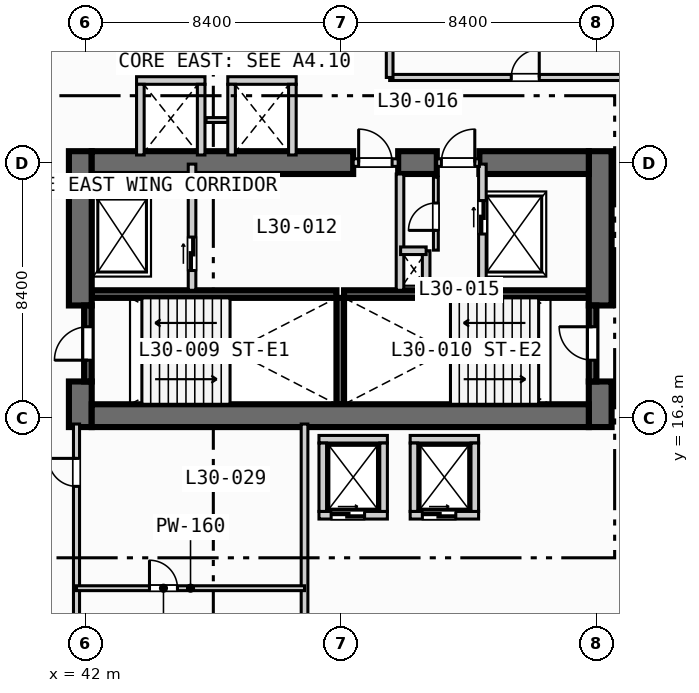
"""IFC4 building model, lengths in metres.
Left out: names, types, materials, properties, quantities, classifications, styles, units other than length and angle.
Written with IfcOpenShell. Run it as: python <this file> out.ifc"""

import sys

from ifc_helpers import new_model, si_unit, direction, frame, frame_2d, origin, place, context, subcontext, project, spatial, rectangle, extrude, element, fill, save


model = new_model("IFC4")
c1 = context("Model", 3, precision=1e-05, world=origin(), true_north=direction((0.0, 1.0)))
c2 = subcontext(c1, "Body", "Model", "MODEL_VIEW")
j1 = project(units=[si_unit("LENGTHUNIT", "METRE"), si_unit("PLANEANGLEUNIT", "RADIAN")], contexts=[c1])
p1 = place(None, origin())
s1 = spatial("IfcSite", under=j1, at=p1, CompositionType="ELEMENT")
p2 = place(p1, origin())
s2 = spatial("IfcBuilding", under=s1, at=p2, CompositionType="ELEMENT")
p3 = place(p2, frame((0.0, 0.0, 126.6)))
s3 = spatial("IfcBuildingStorey", under=s2, at=p3, CompositionType="ELEMENT", Elevation=126.6)
for number, where, z_axis, x_axis in (
    (1, (42.2, 20.875, 0.0), (0.0, 0.0, 1.0), (1.0, 0.0, 0.0)),
    (2, (50.5, 20.875, 0.0), (0.0, 0.0, 1.0), (1.0, 0.0, 0.0)),
):
    element("IfcWall", number, at=place(p3, frame(where, z_axis=z_axis, x_axis=x_axis)), inside=s3, PredefinedType="SOLIDWALL", context=c2, shape_type="SweptSolid", body=[
        extrude(rectangle(XDim=8.05, YDim=0.25, at=frame_2d((4.025, 0.0))), origin(), (0.0, 0.0, 1.0), 3.55),
    ])
p4 = place(p3, frame((50.375, 17.25, 0.0), z_axis=(0.0, 0.0, 1.0), x_axis=(0.0, 1.0, 0.0)))
e3 = element("IfcWall", 3, at=p4, inside=s3, PredefinedType="SOLIDWALL", context=c2, shape_type="SweptSolid", body=[
    extrude(rectangle(XDim=3.5, YDim=0.25, at=frame_2d((1.75, 0.0))), origin(), (0.0, 0.0, 1.0), 3.55),
])
p5 = place(p3, frame((41.825, 16.5, 0.0), z_axis=(0.0, 0.0, 1.0), x_axis=(0.0, 1.0, 0.0)))
e4 = element("IfcWall", 4, at=p5, inside=s3, PredefinedType="SHEAR", context=c2, shape_type="SweptSolid", body=[
    extrude(rectangle(XDim=1.5, YDim=0.75, at=frame_2d((0.75, 0.0))), origin(), (0.0, 0.0, 1.0), 3.55),
])
p6 = place(p3, frame((41.825, 20.5, 0.0), z_axis=(0.0, 0.0, 1.0), x_axis=(0.0, 1.0, 0.0)))
e5 = element("IfcWall", 5, at=p6, inside=s3, PredefinedType="SHEAR", context=c2, shape_type="SweptSolid", body=[
    extrude(rectangle(XDim=5.075, YDim=0.75, at=frame_2d((2.538, 0.0))), origin(), (0.0, 0.0, 1.0), 3.55),
])
p7 = place(p3, frame((58.925, 16.5, 0.0), z_axis=(0.0, 0.0, 1.0), x_axis=(0.0, 1.0, 0.0)))
e6 = element("IfcWall", 6, at=p7, inside=s3, PredefinedType="SHEAR", context=c2, shape_type="SweptSolid", body=[
    extrude(rectangle(XDim=1.5, YDim=0.75, at=frame_2d((0.75, 0.0))), origin(), (0.0, 0.0, 1.0), 3.55),
])
p8 = place(p3, frame((58.925, 20.5, 0.0), z_axis=(0.0, 0.0, 1.0), x_axis=(0.0, 1.0, 0.0)))
e7 = element("IfcWall", 7, at=p8, inside=s3, PredefinedType="SHEAR", context=c2, shape_type="SweptSolid", body=[
    extrude(rectangle(XDim=5.075, YDim=0.75, at=frame_2d((2.538, 0.0))), origin(), (0.0, 0.0, 1.0), 3.55),
])
p9 = place(p3, frame((42.2, 16.875, 0.0), z_axis=(0.0, 0.0, 1.0), x_axis=(1.0, 0.0, 0.0)))
e8 = element("IfcWall", 8, at=p9, inside=s3, PredefinedType="SHEAR", context=c2, shape_type="SweptSolid", body=[
    extrude(rectangle(XDim=16.35, YDim=0.75, at=frame_2d((8.175, 0.0))), origin(), (0.0, 0.0, 1.0), 3.55),
])
p10 = place(p3, frame((42.2, 25.2, 0.0), z_axis=(0.0, 0.0, 1.0), x_axis=(1.0, 0.0, 0.0)))
e9 = element("IfcWall", 9, at=p10, inside=s3, PredefinedType="SHEAR", context=c2, shape_type="SweptSolid", body=[
    extrude(rectangle(XDim=8.6, YDim=0.75, at=frame_2d((4.3, 0.0))), origin(), (0.0, 0.0, 1.0), 3.55),
])
p11 = place(p3, frame((52.28, 25.2, 0.0), z_axis=(0.0, 0.0, 1.0), x_axis=(1.0, 0.0, 0.0)))
e10 = element("IfcWall", 10, at=p11, inside=s3, PredefinedType="SHEAR", context=c2, shape_type="SweptSolid", body=[
    extrude(rectangle(XDim=1.27, YDim=0.75, at=frame_2d((0.635, 0.0))), origin(), (0.0, 0.0, 1.0), 3.55),
])
p12 = place(p3, frame((54.95, 25.2, 0.0), z_axis=(0.0, 0.0, 1.0), x_axis=(1.0, 0.0, 0.0)))
e11 = element("IfcWall", 11, at=p12, inside=s3, PredefinedType="SHEAR", context=c2, shape_type="SweptSolid", body=[
    extrude(rectangle(XDim=3.6, YDim=0.75, at=frame_2d((1.8, 0.0))), origin(), (0.0, 0.0, 1.0), 3.55),
])
p13 = place(p3, frame((42.075, 18.0, 0.0), z_axis=(0.0, 0.0, 1.0), x_axis=(0.0, 1.0, 0.0)))
e12 = element("IfcWall", 12, at=p13, inside=s3, PredefinedType="SOLIDWALL", context=c2, shape_type="SweptSolid", body=[
    extrude(rectangle(XDim=2.5, YDim=0.25, at=frame_2d((1.25, 0.0))), origin(), (0.0, 0.0, 1.0), 3.55),
])
p14 = place(p13, frame((0.7, 0.0, 0.0)))
e13 = element("IfcOpeningElement", 13, at=p14, cuts=e12, PredefinedType="OPENING", context=c2, shape_type="SweptSolid", body=[
    extrude(rectangle(XDim=1.1, YDim=2.15, at=frame_2d((0.55, 1.075))), frame((0.0, 0.135, 0.0), z_axis=(0.0, -1.0, 0.0), x_axis=(1.0, 0.0, 0.0)), (0.0, 0.0, 1.0), 0.27),
])
p15 = place(p3, frame((58.675, 18.0, 0.0), z_axis=(0.0, 0.0, 1.0), x_axis=(0.0, 1.0, 0.0)))
e14 = element("IfcWall", 14, at=p15, inside=s3, PredefinedType="SOLIDWALL", context=c2, shape_type="SweptSolid", body=[
    extrude(rectangle(XDim=2.5, YDim=0.25, at=frame_2d((1.25, 0.0))), origin(), (0.0, 0.0, 1.0), 3.55),
])
p16 = place(p15, frame((0.7, 0.0, 0.0)))
e15 = element("IfcOpeningElement", 15, at=p16, cuts=e14, PredefinedType="OPENING", context=c2, shape_type="SweptSolid", body=[
    extrude(rectangle(XDim=1.1, YDim=2.15, at=frame_2d((0.55, 1.075))), frame((0.0, 0.135, 0.0), z_axis=(0.0, -1.0, 0.0), x_axis=(1.0, 0.0, 0.0)), (0.0, 0.0, 1.0), 0.27),
])
p17 = place(p3, frame((45.5, 21.0, 0.0), z_axis=(0.0, 0.0, 1.0), x_axis=(0.0, 1.0, 0.0)))
e16 = element("IfcWall", 16, at=p17, inside=s3, PredefinedType="SOLIDWALL", context=c2, shape_type="SweptSolid", body=[
    extrude(rectangle(XDim=4.15, YDim=0.25, at=frame_2d((2.075, 0.0))), origin(), (0.0, 0.0, 1.0), 3.55),
])
p18 = place(p17, frame((0.65, 0.0, 0.0)))
e17 = element("IfcOpeningElement", 17, at=p18, cuts=e16, PredefinedType="OPENING", context=c2, shape_type="SweptSolid", body=[
    extrude(rectangle(XDim=1.1, YDim=2.15, at=frame_2d((0.55, 1.075))), frame((0.0, 0.135, 0.0), z_axis=(0.0, -1.0, 0.0), x_axis=(1.0, 0.0, 0.0)), (0.0, 0.0, 1.0), 0.27),
])
p19 = place(p3, frame((50.8, 25.2, 0.0), z_axis=(0.0, 0.0, 1.0), x_axis=(1.0, 0.0, 0.0)))
e18 = element("IfcWall", 18, at=p19, inside=s3, PredefinedType="SOLIDWALL", context=c2, shape_type="SweptSolid", body=[
    extrude(rectangle(XDim=1.48, YDim=0.25, at=frame_2d((0.74, 0.0))), origin(), (0.0, 0.0, 1.0), 3.55),
])
p20 = place(p19, frame((0.18, 0.0, 0.0)))
e19 = element("IfcOpeningElement", 19, at=p20, cuts=e18, PredefinedType="OPENING", context=c2, shape_type="SweptSolid", body=[
    extrude(rectangle(XDim=1.1, YDim=2.15, at=frame_2d((0.55, 1.075))), frame((0.0, 0.135, 0.0), z_axis=(0.0, -1.0, 0.0), x_axis=(1.0, 0.0, 0.0)), (0.0, 0.0, 1.0), 0.27),
])
p21 = place(p3, frame((52.34, 21.0, 0.0), z_axis=(0.0, 0.0, 1.0), x_axis=(0.0, 1.0, 0.0)))
e20 = element("IfcWall", 20, at=p21, inside=s3, PredefinedType="SOLIDWALL", context=c2, shape_type="SweptSolid", body=[
    extrude(rectangle(XDim=3.825, YDim=0.25, at=frame_2d((1.913, 0.0))), origin(), (0.0, 0.0, 1.0), 3.55),
])
p22 = place(p3, frame((55.05, 21.0, 0.0), z_axis=(0.0, 0.0, 1.0), x_axis=(0.0, 1.0, 0.0)))
e21 = element("IfcWall", 21, at=p22, inside=s3, PredefinedType="SOLIDWALL", context=c2, shape_type="SweptSolid", body=[
    extrude(rectangle(XDim=4.15, YDim=0.25, at=frame_2d((2.075, 0.0))), origin(), (0.0, 0.0, 1.0), 3.55),
])
p23 = place(p22, frame((1.85, 0.0, 0.0)))
e22 = element("IfcOpeningElement", 22, at=p23, cuts=e21, PredefinedType="OPENING", context=c2, shape_type="SweptSolid", body=[
    extrude(rectangle(XDim=1.1, YDim=2.15, at=frame_2d((0.55, 1.075))), frame((0.0, 0.135, 0.0), z_axis=(0.0, -1.0, 0.0), x_axis=(1.0, 0.0, 0.0)), (0.0, 0.0, 1.0), 0.27),
])
p24 = place(p3, frame((53.55, 25.2, 0.0), z_axis=(0.0, 0.0, 1.0), x_axis=(1.0, 0.0, 0.0)))
e23 = element("IfcWall", 23, at=p24, inside=s3, PredefinedType="SOLIDWALL", context=c2, shape_type="SweptSolid", body=[
    extrude(rectangle(XDim=1.4, YDim=0.25, at=frame_2d((0.7, 0.0))), origin(), (0.0, 0.0, 1.0), 3.55),
])
p25 = place(p24, frame((0.15, 0.0, 0.0)))
e24 = element("IfcOpeningElement", 24, at=p25, cuts=e23, PredefinedType="OPENING", context=c2, shape_type="SweptSolid", body=[
    extrude(rectangle(XDim=1.1, YDim=2.15, at=frame_2d((0.55, 1.075))), frame((0.0, 0.135, 0.0), z_axis=(0.0, -1.0, 0.0), x_axis=(1.0, 0.0, 0.0)), (0.0, 0.0, 1.0), 0.27),
])
p26 = place(p3, frame((53.2, 21.0, 0.0), z_axis=(0.0, 0.0, 1.0), x_axis=(0.0, 1.0, 0.0)))
e25 = element("IfcWall", 25, at=p26, inside=s3, PredefinedType="SOLIDWALL", context=c2, shape_type="SweptSolid", body=[
    extrude(rectangle(XDim=1.3, YDim=0.25, at=frame_2d((0.65, 0.0))), origin(), (0.0, 0.0, 1.0), 3.55),
])
p27 = place(p3, frame((52.36, 22.3, 0.0), z_axis=(0.0, 0.0, 1.0), x_axis=(1.0, 0.0, 0.0)))
e26 = element("IfcWall", 26, at=p27, inside=s3, PredefinedType="SOLIDWALL", context=c2, shape_type="SweptSolid", body=[
    extrude(rectangle(XDim=0.84, YDim=0.25, at=frame_2d((0.42, 0.0))), origin(), (0.0, 0.0, 1.0), 3.55),
])
p28 = place(p3, frame((53.52, 22.32, 0.0), z_axis=(0.0, 0.0, 1.0), x_axis=(0.0, 1.0, 0.0)))
e27 = element("IfcWall", 27, at=p28, inside=s3, PredefinedType="PARTITIONING", context=c2, shape_type="SweptSolid", body=[
    extrude(rectangle(XDim=2.4, YDim=0.16, at=frame_2d((1.2, 0.0))), origin(), (0.0, 0.0, 1.0), 3.55),
])
p29 = place(p28, frame((0.65, 0.0, 0.0)))
e28 = element("IfcOpeningElement", 28, at=p29, cuts=e27, PredefinedType="OPENING", context=c2, shape_type="SweptSolid", body=[
    extrude(rectangle(XDim=0.9, YDim=2.1, at=frame_2d((0.45, 1.05))), frame((0.0, 0.09, 0.0), z_axis=(0.0, -1.0, 0.0), x_axis=(1.0, 0.0, 0.0)), (0.0, 0.0, 1.0), 0.18),
])
p30 = place(p3, frame((49.675, 13.6, 0.0), z_axis=(0.0, 0.0, 1.0), x_axis=(1.0, 0.0, 0.0)))
e29 = element("IfcWall", 29, at=p30, inside=s3, PredefinedType="SOLIDWALL", context=c2, shape_type="SweptSolid", body=[
    extrude(rectangle(XDim=2.25, YDim=0.25, at=frame_2d((1.125, 0.0))), origin(), (0.0, 0.0, 1.0), 3.55),
])
p31 = place(p30, frame((0.4, 0.0, 0.0)))
e30 = element("IfcOpeningElement", 30, at=p31, cuts=e29, PredefinedType="OPENING", context=c2, shape_type="SweptSolid", body=[
    extrude(rectangle(XDim=1.1, YDim=2.15, at=frame_2d((0.55, 1.075))), frame((0.0, 0.135, 0.0), z_axis=(0.0, -1.0, 0.0), x_axis=(1.0, 0.0, 0.0)), (0.0, 0.0, 1.0), 0.27),
])
for number, where, z_axis, x_axis in (
    (31, (49.675, 16.1, 0.0), (0.0, 0.0, 1.0), (1.0, 0.0, 0.0)),
    (32, (49.8, 13.725, 0.0), (0.0, 0.0, 1.0), (0.0, 1.0, 0.0)),
    (33, (51.8, 13.725, 0.0), (0.0, 0.0, 1.0), (0.0, 1.0, 0.0)),
):
    element("IfcWall", number, at=place(p3, frame(where, z_axis=z_axis, x_axis=x_axis)), inside=s3, PredefinedType="SOLIDWALL", context=c2, shape_type="SweptSolid", body=[
        extrude(rectangle(XDim=2.25, YDim=0.25, at=frame_2d((1.125, 0.0))), origin(), (0.0, 0.0, 1.0), 3.55),
    ])
p32 = place(p3, frame((52.675, 13.6, 0.0), z_axis=(0.0, 0.0, 1.0), x_axis=(1.0, 0.0, 0.0)))
e34 = element("IfcWall", 34, at=p32, inside=s3, PredefinedType="SOLIDWALL", context=c2, shape_type="SweptSolid", body=[
    extrude(rectangle(XDim=2.25, YDim=0.25, at=frame_2d((1.125, 0.0))), origin(), (0.0, 0.0, 1.0), 3.55),
])
p33 = place(p32, frame((0.4, 0.0, 0.0)))
e35 = element("IfcOpeningElement", 35, at=p33, cuts=e34, PredefinedType="OPENING", context=c2, shape_type="SweptSolid", body=[
    extrude(rectangle(XDim=1.1, YDim=2.15, at=frame_2d((0.55, 1.075))), frame((0.0, 0.135, 0.0), z_axis=(0.0, -1.0, 0.0), x_axis=(1.0, 0.0, 0.0)), (0.0, 0.0, 1.0), 0.27),
])
for number, where, z_axis, x_axis in (
    (36, (52.675, 16.1, 0.0), (0.0, 0.0, 1.0), (1.0, 0.0, 0.0)),
    (37, (52.8, 13.725, 0.0), (0.0, 0.0, 1.0), (0.0, 1.0, 0.0)),
    (38, (54.8, 13.725, 0.0), (0.0, 0.0, 1.0), (0.0, 1.0, 0.0)),
    (39, (43.675, 27.9, 0.0), (0.0, 0.0, 1.0), (1.0, 0.0, 0.0)),
):
    element("IfcWall", number, at=place(p3, frame(where, z_axis=z_axis, x_axis=x_axis)), inside=s3, PredefinedType="SOLIDWALL", context=c2, shape_type="SweptSolid", body=[
        extrude(rectangle(XDim=2.25, YDim=0.25, at=frame_2d((1.125, 0.0))), origin(), (0.0, 0.0, 1.0), 3.55),
    ])
for number, where, z_axis, x_axis in (
    (40, (43.8, 25.45, 0.0), (0.0, 0.0, 1.0), (0.0, 1.0, 0.0)),
    (41, (45.8, 25.45, 0.0), (0.0, 0.0, 1.0), (0.0, 1.0, 0.0)),
):
    element("IfcWall", number, at=place(p3, frame(where, z_axis=z_axis, x_axis=x_axis)), inside=s3, PredefinedType="SOLIDWALL", context=c2, shape_type="SweptSolid", body=[
        extrude(rectangle(XDim=2.325, YDim=0.25, at=frame_2d((1.163, 0.0))), origin(), (0.0, 0.0, 1.0), 3.55),
    ])
p34 = place(p3, frame((45.96, 26.6, 0.0), z_axis=(0.0, 0.0, 1.0), x_axis=(1.0, 0.0, 0.0)))
e42 = element("IfcWall", 42, at=p34, inside=s3, PredefinedType="PARTITIONING", context=c2, shape_type="SweptSolid", body=[
    extrude(rectangle(XDim=0.88, YDim=0.16, at=frame_2d((0.44, 0.0))), origin(), (0.0, 0.0, 1.0), 3.55),
])
p35 = place(p3, frame((46.675, 27.9, 0.0), z_axis=(0.0, 0.0, 1.0), x_axis=(1.0, 0.0, 0.0)))
e43 = element("IfcWall", 43, at=p35, inside=s3, PredefinedType="SOLIDWALL", context=c2, shape_type="SweptSolid", body=[
    extrude(rectangle(XDim=2.25, YDim=0.25, at=frame_2d((1.125, 0.0))), origin(), (0.0, 0.0, 1.0), 3.55),
])
for number, where, z_axis, x_axis in (
    (44, (46.8, 25.45, 0.0), (0.0, 0.0, 1.0), (0.0, 1.0, 0.0)),
    (45, (48.8, 25.45, 0.0), (0.0, 0.0, 1.0), (0.0, 1.0, 0.0)),
):
    element("IfcWall", number, at=place(p3, frame(where, z_axis=z_axis, x_axis=x_axis)), inside=s3, PredefinedType="SOLIDWALL", context=c2, shape_type="SweptSolid", body=[
        extrude(rectangle(XDim=2.325, YDim=0.25, at=frame_2d((1.163, 0.0))), origin(), (0.0, 0.0, 1.0), 3.55),
    ])
p36 = place(p3, frame((41.7, 0.35, 0.0), z_axis=(0.0, 0.0, 1.0), x_axis=(0.0, 1.0, 0.0)))
e46 = element("IfcWall", 46, at=p36, inside=s3, PredefinedType="PARTITIONING", context=c2, shape_type="SweptSolid", body=[
    extrude(rectangle(XDim=16.25, YDim=0.2, at=frame_2d((8.125, 0.0))), origin(), (0.0, 0.0, 1.0), 2.8),
])
p37 = place(p36, frame((14.2, 0.0, 0.0)))
e47 = element("IfcOpeningElement", 47, at=p37, cuts=e46, PredefinedType="OPENING", context=c2, shape_type="SweptSolid", body=[
    extrude(rectangle(XDim=0.92, YDim=2.1, at=frame_2d((0.46, 1.05))), frame((0.0, 0.11, 0.0), z_axis=(0.0, -1.0, 0.0), x_axis=(1.0, 0.0, 0.0)), (0.0, 0.0, 1.0), 0.22),
])
p38 = place(p3, frame((49.2, 0.35, 0.0), z_axis=(0.0, 0.0, 1.0), x_axis=(0.0, 1.0, 0.0)))
e48 = element("IfcWall", 48, at=p38, inside=s3, PredefinedType="PARTITIONING", context=c2, shape_type="SweptSolid", body=[
    extrude(rectangle(XDim=16.25, YDim=0.22, at=frame_2d((8.125, 0.0))), origin(), (0.0, 0.0, 1.0), 3.55),
])
p39 = place(p3, frame((41.7, 11.2, 0.0), z_axis=(0.0, 0.0, 1.0), x_axis=(1.0, 0.0, 0.0)))
e49 = element("IfcWall", 49, at=p39, inside=s3, PredefinedType="PARTITIONING", context=c2, shape_type="SweptSolid", body=[
    extrude(rectangle(XDim=7.5, YDim=0.16, at=frame_2d((3.75, 0.0))), origin(), (0.0, 0.0, 1.0), 3.55),
])
p40 = place(p39, frame((2.4, 0.0, 0.0)))
e50 = element("IfcOpeningElement", 50, at=p40, cuts=e49, PredefinedType="OPENING", context=c2, shape_type="SweptSolid", body=[
    extrude(rectangle(XDim=0.92, YDim=2.1, at=frame_2d((0.46, 1.05))), frame((0.0, 0.09, 0.0), z_axis=(0.0, -1.0, 0.0), x_axis=(1.0, 0.0, 0.0)), (0.0, 0.0, 1.0), 0.18),
])
p41 = place(p3, frame((52.0, 28.0, 0.0), z_axis=(0.0, 0.0, 1.0), x_axis=(1.0, 0.0, 0.0)))
e51 = element("IfcWall", 51, at=p41, inside=s3, PredefinedType="PARTITIONING", context=c2, shape_type="SweptSolid", body=[
    extrude(rectangle(XDim=23.25, YDim=0.2, at=frame_2d((11.625, 0.0))), origin(), (0.0, 0.0, 1.0), 3.55),
])
p42 = place(p41, frame((4.0, 0.0, 0.0)))
e52 = element("IfcOpeningElement", 52, at=p42, cuts=e51, PredefinedType="OPENING", context=c2, shape_type="SweptSolid", body=[
    extrude(rectangle(XDim=0.92, YDim=2.1, at=frame_2d((0.46, 1.05))), frame((0.0, 0.11, 0.0), z_axis=(0.0, -1.0, 0.0), x_axis=(1.0, 0.0, 0.0)), (0.0, 0.0, 1.0), 0.22),
])
p43 = place(p3, frame((52.0, 28.0, 0.0), z_axis=(0.0, 0.0, 1.0), x_axis=(0.0, 1.0, 0.0)))
e53 = element("IfcWall", 53, at=p43, inside=s3, PredefinedType="PARTITIONING", context=c2, shape_type="SweptSolid", body=[
    extrude(rectangle(XDim=5.3, YDim=0.22, at=frame_2d((2.65, 0.0))), origin(), (0.0, 0.0, 1.0), 3.55),
])
p44 = place(p14, origin())
e54 = element("IfcDoor", 54, at=p44, inside=s3, OperationType="SINGLE_SWING_LEFT", PredefinedType="DOOR", context=c2, shape_type="SweptSolid", body=[
    extrude(rectangle(XDim=1.1, YDim=2.15, at=frame_2d((0.55, 1.075))), frame((0.0, 0.025, 0.0), z_axis=(0.0, -1.0, 0.0), x_axis=(1.0, 0.0, 0.0)), (0.0, 0.0, 1.0), 0.05),
])
fill(e13, e54)
p45 = place(p16, origin())
e55 = element("IfcDoor", 55, at=p45, inside=s3, OperationType="SINGLE_SWING_RIGHT", PredefinedType="DOOR", context=c2, shape_type="SweptSolid", body=[
    extrude(rectangle(XDim=1.1, YDim=2.15, at=frame_2d((0.55, 1.075))), frame((0.0, 0.025, 0.0), z_axis=(0.0, -1.0, 0.0), x_axis=(1.0, 0.0, 0.0)), (0.0, 0.0, 1.0), 0.05),
])
fill(e15, e55)
p46 = place(p18, origin())
e56 = element("IfcDoor", 56, at=p46, inside=s3, OperationType="SLIDING_TO_LEFT", PredefinedType="DOOR", context=c2, shape_type="SweptSolid", body=[
    extrude(rectangle(XDim=1.1, YDim=2.15, at=frame_2d((0.55, 1.075))), frame((0.0, 0.025, 0.0), z_axis=(0.0, -1.0, 0.0), x_axis=(1.0, 0.0, 0.0)), (0.0, 0.0, 1.0), 0.05),
])
fill(e17, e56)
p47 = place(p20, origin())
e57 = element("IfcDoor", 57, at=p47, inside=s3, OperationType="SINGLE_SWING_LEFT", PredefinedType="DOOR", context=c2, shape_type="SweptSolid", body=[
    extrude(rectangle(XDim=1.1, YDim=2.15, at=frame_2d((0.55, 1.075))), frame((0.0, 0.025, 0.0), z_axis=(0.0, -1.0, 0.0), x_axis=(1.0, 0.0, 0.0)), (0.0, 0.0, 1.0), 0.05),
])
fill(e19, e57)
p48 = place(p23, origin())
e58 = element("IfcDoor", 58, at=p48, inside=s3, OperationType="SLIDING_TO_LEFT", PredefinedType="DOOR", context=c2, shape_type="SweptSolid", body=[
    extrude(rectangle(XDim=1.1, YDim=2.15, at=frame_2d((0.55, 1.075))), frame((0.0, 0.025, 0.0), z_axis=(0.0, -1.0, 0.0), x_axis=(1.0, 0.0, 0.0)), (0.0, 0.0, 1.0), 0.05),
])
fill(e22, e58)
p49 = place(p25, origin())
e59 = element("IfcDoor", 59, at=p49, inside=s3, OperationType="SINGLE_SWING_RIGHT", PredefinedType="DOOR", context=c2, shape_type="SweptSolid", body=[
    extrude(rectangle(XDim=1.1, YDim=2.15, at=frame_2d((0.55, 1.075))), frame((0.0, 0.025, 0.0), z_axis=(0.0, -1.0, 0.0), x_axis=(1.0, 0.0, 0.0)), (0.0, 0.0, 1.0), 0.05),
])
fill(e24, e59)
p50 = place(p29, origin())
e60 = element("IfcDoor", 60, at=p50, inside=s3, OperationType="SINGLE_SWING_LEFT", PredefinedType="DOOR", context=c2, shape_type="SweptSolid", body=[
    extrude(rectangle(XDim=0.9, YDim=2.1, at=frame_2d((0.45, 1.05))), frame((0.0, 0.025, 0.0), z_axis=(0.0, -1.0, 0.0), x_axis=(1.0, 0.0, 0.0)), (0.0, 0.0, 1.0), 0.05),
])
fill(e28, e60)
p51 = place(p31, origin())
e61 = element("IfcDoor", 61, at=p51, inside=s3, OperationType="SLIDING_TO_LEFT", PredefinedType="DOOR", context=c2, shape_type="SweptSolid", body=[
    extrude(rectangle(XDim=1.1, YDim=2.15, at=frame_2d((0.55, 1.075))), frame((0.0, 0.025, 0.0), z_axis=(0.0, -1.0, 0.0), x_axis=(1.0, 0.0, 0.0)), (0.0, 0.0, 1.0), 0.05),
])
fill(e30, e61)
p52 = place(p33, origin())
e62 = element("IfcDoor", 62, at=p52, inside=s3, OperationType="SLIDING_TO_LEFT", PredefinedType="DOOR", context=c2, shape_type="SweptSolid", body=[
    extrude(rectangle(XDim=1.1, YDim=2.15, at=frame_2d((0.55, 1.075))), frame((0.0, 0.025, 0.0), z_axis=(0.0, -1.0, 0.0), x_axis=(1.0, 0.0, 0.0)), (0.0, 0.0, 1.0), 0.05),
])
fill(e35, e62)
p53 = place(p37, origin())
e63 = element("IfcDoor", 63, at=p53, inside=s3, OperationType="SINGLE_SWING_RIGHT", PredefinedType="DOOR", context=c2, shape_type="SweptSolid", body=[
    extrude(rectangle(XDim=0.92, YDim=2.1, at=frame_2d((0.46, 1.05))), frame((0.0, 0.025, 0.0), z_axis=(0.0, -1.0, 0.0), x_axis=(1.0, 0.0, 0.0)), (0.0, 0.0, 1.0), 0.05),
])
fill(e47, e63)
p54 = place(p40, origin())
e64 = element("IfcDoor", 64, at=p54, inside=s3, OperationType="SINGLE_SWING_LEFT", PredefinedType="DOOR", context=c2, shape_type="SweptSolid", body=[
    extrude(rectangle(XDim=0.92, YDim=2.1, at=frame_2d((0.46, 1.05))), frame((0.0, 0.025, 0.0), z_axis=(0.0, -1.0, 0.0), x_axis=(1.0, 0.0, 0.0)), (0.0, 0.0, 1.0), 0.05),
])
fill(e50, e64)
p55 = place(p42, origin())
e65 = element("IfcDoor", 65, at=p55, inside=s3, OperationType="SINGLE_SWING_RIGHT", PredefinedType="DOOR", context=c2, shape_type="SweptSolid", body=[
    extrude(rectangle(XDim=0.92, YDim=2.1, at=frame_2d((0.46, 1.05))), frame((0.0, 0.025, 0.0), z_axis=(0.0, -1.0, 0.0), x_axis=(1.0, 0.0, 0.0)), (0.0, 0.0, 1.0), 0.05),
])
fill(e52, e65)
save(model, sys.argv[1])
